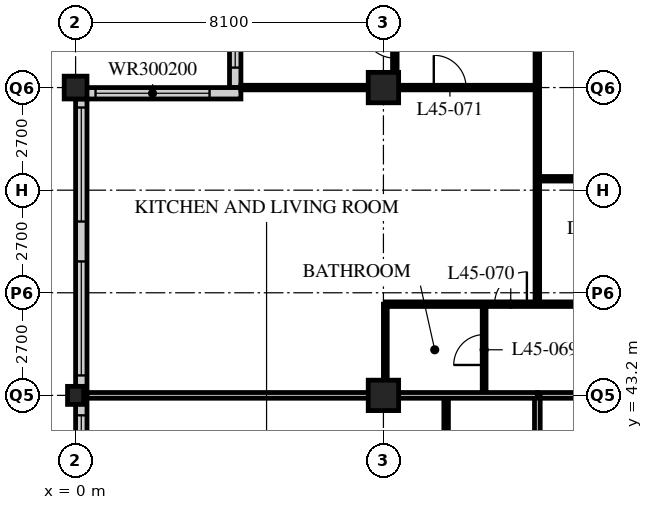
"""IFC4 building model, lengths in metres.
Left out: names, types, materials, properties, quantities, classifications, styles, units other than length and angle.
Written with IfcOpenShell. Run it as: python <this file> out.ifc"""

import sys

from ifc_helpers import new_model, si_unit, direction, frame, frame_2d, origin, origin_2d, place, context, subcontext, project, spatial, rectangle, hollow_rectangle, i_section, extrude, element, fill, save


model = new_model("IFC4")
c1 = context("Model", 3, precision=1e-05, world=origin(), true_north=direction((0.0, 1.0)))
c2 = subcontext(c1, "Body", "Model", "MODEL_VIEW")
j1 = project(units=[si_unit("LENGTHUNIT", "METRE"), si_unit("PLANEANGLEUNIT", "RADIAN")], contexts=[c1])
p1 = place(None, origin())
s1 = spatial("IfcSite", under=j1, at=p1, CompositionType="ELEMENT")
p2 = place(p1, origin())
s2 = spatial("IfcBuilding", under=s1, at=p2, CompositionType="ELEMENT")
p3 = place(p2, frame((0.0, 0.0, 177.6)))
s3 = spatial("IfcBuildingStorey", under=s2, at=p3, CompositionType="ELEMENT", Elevation=177.6)
p4 = place(p3, frame((0.0, 43.2, 0.0), z_axis=(0.0, 0.0, 1.0), x_axis=(1.0, 0.0, 0.0)))
e1 = element("IfcColumn", 1, at=p4, inside=s3, PredefinedType="COLUMN", context=c2, shape_type="SweptSolid", body=[
    extrude(i_section(OverallWidth=0.424, OverallDepth=0.475, WebThickness=0.048, FlangeThickness=0.077, FilletRadius=0.015, at=origin_2d()), origin(), (0.0, 0.0, 1.0), 3.6),
])
p5 = place(p3, frame((0.0, 51.3, 0.0), z_axis=(0.0, 0.0, 1.0), x_axis=(1.0, 0.0, 0.0)))
e2 = element("IfcColumn", 2, at=p5, inside=s3, PredefinedType="COLUMN", context=c2, shape_type="SweptSolid", body=[
    extrude(hollow_rectangle(XDim=0.6, YDim=0.6, WallThickness=0.05, at=origin_2d()), origin(), (0.0, 0.0, 1.0), 3.6),
])
for number, where, z_axis, x_axis in (
    (3, (8.1, 43.2, 0.0), (0.0, 0.0, 1.0), (1.0, 0.0, 0.0)),
    (4, (8.1, 51.3, 0.0), (0.0, 0.0, 1.0), (1.0, 0.0, 0.0)),
):
    element("IfcColumn", number, at=place(p3, frame(where, z_axis=z_axis, x_axis=x_axis)), inside=s3, PredefinedType="COLUMN", context=c2, shape_type="SweptSolid", body=[
        extrude(hollow_rectangle(XDim=0.8, YDim=0.8, WallThickness=0.08, at=origin_2d()), origin(), (0.0, 0.0, 1.0), 3.6),
    ])
p6 = place(p3, frame((4.2, 55.05, 0.0), z_axis=(0.0, 0.0, 1.0), x_axis=(0.0, -1.0, 0.0)))
e5 = element("IfcWall", 5, at=p6, inside=s3, PredefinedType="SOLIDWALL", context=c2, shape_type="SweptSolid", body=[
    extrude(rectangle(XDim=3.75, YDim=0.3, at=frame_2d((1.875, 0.0))), origin(), (0.0, 0.0, 1.0), 3.39),
])
p7 = place(p6, frame((0.225, 0.0, 0.6)))
e6 = element("IfcOpeningElement", 6, at=p7, cuts=e5, PredefinedType="OPENING", context=c2, shape_type="SweptSolid", body=[
    extrude(rectangle(XDim=3.0, YDim=2.0, at=frame_2d((1.5, 1.0))), frame((0.0, 0.16, 0.0), z_axis=(0.0, -1.0, 0.0), x_axis=(1.0, 0.0, 0.0)), (0.0, 0.0, 1.0), 0.32),
])
p8 = place(p3, frame((4.35, 51.15, 0.0), z_axis=(0.0, 0.0, 1.0), x_axis=(-1.0, 0.0, 0.0)))
e7 = element("IfcWall", 7, at=p8, inside=s3, PredefinedType="SOLIDWALL", context=c2, shape_type="SweptSolid", body=[
    extrude(rectangle(XDim=4.35, YDim=0.3, at=frame_2d((2.175, 0.0))), origin(), (0.0, 0.0, 1.0), 3.39),
])
p9 = place(p8, frame((0.825, 0.0, 0.6)))
e8 = element("IfcOpeningElement", 8, at=p9, cuts=e7, PredefinedType="OPENING", context=c2, shape_type="SweptSolid", body=[
    extrude(rectangle(XDim=3.0, YDim=2.0, at=frame_2d((1.5, 1.0))), frame((0.0, 0.16, 0.0), z_axis=(0.0, -1.0, 0.0), x_axis=(1.0, 0.0, 0.0)), (0.0, 0.0, 1.0), 0.32),
])
p10 = place(p3, frame((0.15, 51.0, 0.0), z_axis=(0.0, 0.0, 1.0), x_axis=(0.0, -1.0, 0.0)))
e9 = element("IfcWall", 9, at=p10, inside=s3, PredefinedType="SOLIDWALL", context=c2, shape_type="SweptSolid", body=[
    extrude(rectangle(XDim=32.1, YDim=0.3, at=frame_2d((16.05, 0.0))), origin(), (0.0, 0.0, 1.0), 3.39),
])
p11 = place(p10, frame((0.225, 0.0, 0.6)))
e10 = element("IfcOpeningElement", 10, at=p11, cuts=e9, PredefinedType="OPENING", context=c2, shape_type="SweptSolid", body=[
    extrude(rectangle(XDim=3.0, YDim=2.4, at=frame_2d((1.5, 1.2))), frame((0.0, 0.16, 0.0), z_axis=(0.0, -1.0, 0.0), x_axis=(1.0, 0.0, 0.0)), (0.0, 0.0, 1.0), 0.32),
])
p12 = place(p10, frame((4.275, 0.0, 0.6)))
e11 = element("IfcOpeningElement", 11, at=p12, cuts=e9, PredefinedType="OPENING", context=c2, shape_type="SweptSolid", body=[
    extrude(rectangle(XDim=3.0, YDim=2.4, at=frame_2d((1.5, 1.2))), frame((0.0, 0.16, 0.0), z_axis=(0.0, -1.0, 0.0), x_axis=(1.0, 0.0, 0.0)), (0.0, 0.0, 1.0), 0.32),
])
p13 = place(p10, frame((8.325, 0.0, 0.6)))
e12 = element("IfcOpeningElement", 12, at=p13, cuts=e9, PredefinedType="OPENING", context=c2, shape_type="SweptSolid", body=[
    extrude(rectangle(XDim=3.0, YDim=2.4, at=frame_2d((1.5, 1.2))), frame((0.0, 0.16, 0.0), z_axis=(0.0, -1.0, 0.0), x_axis=(1.0, 0.0, 0.0)), (0.0, 0.0, 1.0), 0.32),
])
p14 = place(p10, frame((12.375, 0.0, 0.6)))
e13 = element("IfcOpeningElement", 13, at=p14, cuts=e9, PredefinedType="OPENING", context=c2, shape_type="SweptSolid", body=[
    extrude(rectangle(XDim=3.0, YDim=2.4, at=frame_2d((1.5, 1.2))), frame((0.0, 0.16, 0.0), z_axis=(0.0, -1.0, 0.0), x_axis=(1.0, 0.0, 0.0)), (0.0, 0.0, 1.0), 0.32),
])
p15 = place(p10, frame((16.425, 0.0, 0.6)))
e14 = element("IfcOpeningElement", 14, at=p15, cuts=e9, PredefinedType="OPENING", context=c2, shape_type="SweptSolid", body=[
    extrude(rectangle(XDim=3.0, YDim=2.4, at=frame_2d((1.5, 1.2))), frame((0.0, 0.16, 0.0), z_axis=(0.0, -1.0, 0.0), x_axis=(1.0, 0.0, 0.0)), (0.0, 0.0, 1.0), 0.32),
])
p16 = place(p10, frame((20.475, 0.0, 0.6)))
e15 = element("IfcOpeningElement", 15, at=p16, cuts=e9, PredefinedType="OPENING", context=c2, shape_type="SweptSolid", body=[
    extrude(rectangle(XDim=3.0, YDim=2.4, at=frame_2d((1.5, 1.2))), frame((0.0, 0.16, 0.0), z_axis=(0.0, -1.0, 0.0), x_axis=(1.0, 0.0, 0.0)), (0.0, 0.0, 1.0), 0.32),
])
p17 = place(p10, frame((24.525, 0.0, 0.6)))
e16 = element("IfcOpeningElement", 16, at=p17, cuts=e9, PredefinedType="OPENING", context=c2, shape_type="SweptSolid", body=[
    extrude(rectangle(XDim=3.0, YDim=2.4, at=frame_2d((1.5, 1.2))), frame((0.0, 0.16, 0.0), z_axis=(0.0, -1.0, 0.0), x_axis=(1.0, 0.0, 0.0)), (0.0, 0.0, 1.0), 0.32),
])
p18 = place(p10, frame((28.575, 0.0, 0.6)))
e17 = element("IfcOpeningElement", 17, at=p18, cuts=e9, PredefinedType="OPENING", context=c2, shape_type="SweptSolid", body=[
    extrude(rectangle(XDim=3.0, YDim=2.4, at=frame_2d((1.5, 1.2))), frame((0.0, 0.16, 0.0), z_axis=(0.0, -1.0, 0.0), x_axis=(1.0, 0.0, 0.0)), (0.0, 0.0, 1.0), 0.32),
])
p19 = place(p3, frame((12.15, 43.2, 0.0), z_axis=(0.0, 0.0, 1.0), x_axis=(1.0, 0.0, 0.0)))
e18 = element("IfcWall", 18, at=p19, inside=s3, PredefinedType="PARTITIONING", context=c2, shape_type="SweptSolid", body=[
    extrude(rectangle(XDim=32.4, YDim=0.15, at=frame_2d((16.2, 0.0))), origin(), (0.0, 0.0, 1.0), 2.778),
])
p20 = place(p19, frame((4.95, 0.0, 0.0)))
e19 = element("IfcOpeningElement", 19, at=p20, cuts=e18, PredefinedType="OPENING", context=c2, shape_type="SweptSolid", body=[
    extrude(rectangle(XDim=1.0, YDim=2.1, at=frame_2d((0.5, 1.05))), frame((0.0, 0.085, 0.0), z_axis=(0.0, -1.0, 0.0), x_axis=(1.0, 0.0, 0.0)), (0.0, 0.0, 1.0), 0.17),
])
p21 = place(p19, frame((13.05, 0.0, 0.0)))
e20 = element("IfcOpeningElement", 20, at=p21, cuts=e18, PredefinedType="OPENING", context=c2, shape_type="SweptSolid", body=[
    extrude(rectangle(XDim=1.0, YDim=2.1, at=frame_2d((0.5, 1.05))), frame((0.0, 0.085, 0.0), z_axis=(0.0, -1.0, 0.0), x_axis=(1.0, 0.0, 0.0)), (0.0, 0.0, 1.0), 0.17),
])
p22 = place(p19, frame((21.15, 0.0, 0.0)))
e21 = element("IfcOpeningElement", 21, at=p22, cuts=e18, PredefinedType="OPENING", context=c2, shape_type="SweptSolid", body=[
    extrude(rectangle(XDim=1.0, YDim=2.1, at=frame_2d((0.5, 1.05))), frame((0.0, 0.085, 0.0), z_axis=(0.0, -1.0, 0.0), x_axis=(1.0, 0.0, 0.0)), (0.0, 0.0, 1.0), 0.17),
])
p23 = place(p19, frame((29.875, 0.0, 0.0)))
e22 = element("IfcOpeningElement", 22, at=p23, cuts=e18, PredefinedType="OPENING", context=c2, shape_type="SweptSolid", body=[
    extrude(rectangle(XDim=1.0, YDim=2.1, at=frame_2d((0.5, 1.05))), frame((0.0, 0.085, 0.0), z_axis=(0.0, -1.0, 0.0), x_axis=(1.0, 0.0, 0.0)), (0.0, 0.0, 1.0), 0.17),
])
p24 = place(p19, frame((1.525, 0.0, 0.0)))
e23 = element("IfcOpeningElement", 23, at=p24, cuts=e18, PredefinedType="OPENING", context=c2, shape_type="SweptSolid", body=[
    extrude(rectangle(XDim=1.0, YDim=2.1, at=frame_2d((0.5, 1.05))), frame((0.0, 0.085, 0.0), z_axis=(0.0, -1.0, 0.0), x_axis=(1.0, 0.0, 0.0)), (0.0, 0.0, 1.0), 0.17),
])
p25 = place(p3, frame((12.15, 18.9, 0.0), z_axis=(0.0, 0.0, 1.0), x_axis=(0.0, 1.0, 0.0)))
e24 = element("IfcWall", 24, at=p25, inside=s3, PredefinedType="PARTITIONING", context=c2, shape_type="SweptSolid", body=[
    extrude(rectangle(XDim=24.3, YDim=0.15, at=frame_2d((12.15, 0.0))), origin(), (0.0, 0.0, 1.0), 3.39),
])
p26 = place(p25, frame((2.35, 0.0, 0.0)))
e25 = element("IfcOpeningElement", 25, at=p26, cuts=e24, PredefinedType="OPENING", context=c2, shape_type="SweptSolid", body=[
    extrude(rectangle(XDim=1.0, YDim=2.1, at=frame_2d((0.5, 1.05))), frame((0.0, 0.085, 0.0), z_axis=(0.0, -1.0, 0.0), x_axis=(1.0, 0.0, 0.0)), (0.0, 0.0, 1.0), 0.17),
])
p27 = place(p25, frame((6.4, 0.0, 0.0)))
e26 = element("IfcOpeningElement", 26, at=p27, cuts=e24, PredefinedType="OPENING", context=c2, shape_type="SweptSolid", body=[
    extrude(rectangle(XDim=1.0, YDim=2.1, at=frame_2d((0.5, 1.05))), frame((0.0, 0.085, 0.0), z_axis=(0.0, -1.0, 0.0), x_axis=(1.0, 0.0, 0.0)), (0.0, 0.0, 1.0), 0.17),
])
p28 = place(p25, frame((8.5, 0.0, 0.0)))
e27 = element("IfcOpeningElement", 27, at=p28, cuts=e24, PredefinedType="OPENING", context=c2, shape_type="SweptSolid", body=[
    extrude(rectangle(XDim=1.0, YDim=2.1, at=frame_2d((0.5, 1.05))), frame((0.0, 0.085, 0.0), z_axis=(0.0, -1.0, 0.0), x_axis=(1.0, 0.0, 0.0)), (0.0, 0.0, 1.0), 0.17),
])
p29 = place(p25, frame((16.6, 0.0, 0.0)))
e28 = element("IfcOpeningElement", 28, at=p29, cuts=e24, PredefinedType="OPENING", context=c2, shape_type="SweptSolid", body=[
    extrude(rectangle(XDim=1.0, YDim=2.1, at=frame_2d((0.5, 1.05))), frame((0.0, 0.085, 0.0), z_axis=(0.0, -1.0, 0.0), x_axis=(1.0, 0.0, 0.0)), (0.0, 0.0, 1.0), 0.17),
])
p30 = place(p3, frame((9.75, 27.0, 0.0), z_axis=(0.0, 0.0, 1.0), x_axis=(0.0, 1.0, 0.0)))
e29 = element("IfcWall", 29, at=p30, inside=s3, PredefinedType="PARTITIONING", context=c2, shape_type="SweptSolid", body=[
    extrude(rectangle(XDim=16.2, YDim=0.12, at=frame_2d((8.1, 0.0))), origin(), (0.0, 0.0, 1.0), 3.39),
])
p31 = place(p30, frame((0.975, 0.0, 0.0)))
e30 = element("IfcOpeningElement", 30, at=p31, cuts=e29, PredefinedType="OPENING", context=c2, shape_type="SweptSolid", body=[
    extrude(rectangle(XDim=0.85, YDim=2.1, at=frame_2d((0.425, 1.05))), frame((0.0, 0.07, 0.0), z_axis=(0.0, -1.0, 0.0), x_axis=(1.0, 0.0, 0.0)), (0.0, 0.0, 1.0), 0.14),
])
p32 = place(p30, frame((4.375, 0.0, 0.0)))
e31 = element("IfcOpeningElement", 31, at=p32, cuts=e29, PredefinedType="OPENING", context=c2, shape_type="SweptSolid", body=[
    extrude(rectangle(XDim=0.85, YDim=2.1, at=frame_2d((0.425, 1.05))), frame((0.0, 0.07, 0.0), z_axis=(0.0, -1.0, 0.0), x_axis=(1.0, 0.0, 0.0)), (0.0, 0.0, 1.0), 0.14),
])
p33 = place(p30, frame((9.075, 0.0, 0.0)))
e32 = element("IfcOpeningElement", 32, at=p33, cuts=e29, PredefinedType="OPENING", context=c2, shape_type="SweptSolid", body=[
    extrude(rectangle(XDim=0.85, YDim=2.1, at=frame_2d((0.425, 1.05))), frame((0.0, 0.07, 0.0), z_axis=(0.0, -1.0, 0.0), x_axis=(1.0, 0.0, 0.0)), (0.0, 0.0, 1.0), 0.14),
])
p34 = place(p30, frame((12.475, 0.0, 0.0)))
e33 = element("IfcOpeningElement", 33, at=p34, cuts=e29, PredefinedType="OPENING", context=c2, shape_type="SweptSolid", body=[
    extrude(rectangle(XDim=0.85, YDim=2.1, at=frame_2d((0.425, 1.05))), frame((0.0, 0.07, 0.0), z_axis=(0.0, -1.0, 0.0), x_axis=(1.0, 0.0, 0.0)), (0.0, 0.0, 1.0), 0.14),
])
p35 = place(p3, frame((10.75, 43.2, 0.0), z_axis=(0.0, 0.0, 1.0), x_axis=(0.0, 1.0, 0.0)))
e34 = element("IfcWall", 34, at=p35, inside=s3, PredefinedType="PARTITIONING", context=c2, shape_type="SweptSolid", body=[
    extrude(rectangle(XDim=2.4, YDim=0.1, at=frame_2d((1.2, 0.0))), origin(), (0.0, 0.0, 1.0), 3.39),
])
p36 = place(p35, frame((0.8, 0.0, 0.0)))
e35 = element("IfcOpeningElement", 35, at=p36, cuts=e34, PredefinedType="OPENING", context=c2, shape_type="SweptSolid", body=[
    extrude(rectangle(XDim=0.8, YDim=2.1, at=frame_2d((0.4, 1.05))), frame((0.0, 0.06, 0.0), z_axis=(0.0, -1.0, 0.0), x_axis=(1.0, 0.0, 0.0)), (0.0, 0.0, 1.0), 0.12),
])
p37 = place(p3, frame((8.15, 43.2, 0.0), z_axis=(0.0, 0.0, 1.0), x_axis=(0.0, 1.0, 0.0)))
e36 = element("IfcWall", 36, at=p37, inside=s3, PredefinedType="PARTITIONING", context=c2, shape_type="SweptSolid", body=[
    extrude(rectangle(XDim=2.4, YDim=0.1, at=frame_2d((1.2, 0.0))), origin(), (0.0, 0.0, 1.0), 2.778),
])
p38 = place(p3, frame((8.15, 45.6, 0.0), z_axis=(0.0, 0.0, 1.0), x_axis=(1.0, 0.0, 0.0)))
e37 = element("IfcWall", 37, at=p38, inside=s3, PredefinedType="PARTITIONING", context=c2, shape_type="SweptSolid", body=[
    extrude(rectangle(XDim=40.4, YDim=0.12, at=frame_2d((20.2, 0.0))), origin(), (0.0, 0.0, 1.0), 3.39),
])
p39 = place(p38, frame((9.025, 0.0, 0.0)))
e38 = element("IfcOpeningElement", 38, at=p39, cuts=e37, PredefinedType="OPENING", context=c2, shape_type="SweptSolid", body=[
    extrude(rectangle(XDim=0.85, YDim=2.1, at=frame_2d((0.425, 1.05))), frame((0.0, 0.07, 0.0), z_axis=(0.0, -1.0, 0.0), x_axis=(1.0, 0.0, 0.0)), (0.0, 0.0, 1.0), 0.14),
])
p40 = place(p38, frame((12.425, 0.0, 0.0)))
e39 = element("IfcOpeningElement", 39, at=p40, cuts=e37, PredefinedType="OPENING", context=c2, shape_type="SweptSolid", body=[
    extrude(rectangle(XDim=0.85, YDim=2.1, at=frame_2d((0.425, 1.05))), frame((0.0, 0.07, 0.0), z_axis=(0.0, -1.0, 0.0), x_axis=(1.0, 0.0, 0.0)), (0.0, 0.0, 1.0), 0.14),
])
p41 = place(p38, frame((17.125, 0.0, 0.0)))
e40 = element("IfcOpeningElement", 40, at=p41, cuts=e37, PredefinedType="OPENING", context=c2, shape_type="SweptSolid", body=[
    extrude(rectangle(XDim=0.85, YDim=2.1, at=frame_2d((0.425, 1.05))), frame((0.0, 0.07, 0.0), z_axis=(0.0, -1.0, 0.0), x_axis=(1.0, 0.0, 0.0)), (0.0, 0.0, 1.0), 0.14),
])
p42 = place(p38, frame((20.525, 0.0, 0.0)))
e41 = element("IfcOpeningElement", 41, at=p42, cuts=e37, PredefinedType="OPENING", context=c2, shape_type="SweptSolid", body=[
    extrude(rectangle(XDim=0.85, YDim=2.1, at=frame_2d((0.425, 1.05))), frame((0.0, 0.07, 0.0), z_axis=(0.0, -1.0, 0.0), x_axis=(1.0, 0.0, 0.0)), (0.0, 0.0, 1.0), 0.14),
])
p43 = place(p38, frame((25.225, 0.0, 0.0)))
e42 = element("IfcOpeningElement", 42, at=p43, cuts=e37, PredefinedType="OPENING", context=c2, shape_type="SweptSolid", body=[
    extrude(rectangle(XDim=0.85, YDim=2.1, at=frame_2d((0.425, 1.05))), frame((0.0, 0.07, 0.0), z_axis=(0.0, -1.0, 0.0), x_axis=(1.0, 0.0, 0.0)), (0.0, 0.0, 1.0), 0.14),
])
p44 = place(p38, frame((28.625, 0.0, 0.0)))
e43 = element("IfcOpeningElement", 43, at=p44, cuts=e37, PredefinedType="OPENING", context=c2, shape_type="SweptSolid", body=[
    extrude(rectangle(XDim=0.85, YDim=2.1, at=frame_2d((0.425, 1.05))), frame((0.0, 0.07, 0.0), z_axis=(0.0, -1.0, 0.0), x_axis=(1.0, 0.0, 0.0)), (0.0, 0.0, 1.0), 0.14),
])
p45 = place(p38, frame((32.825, 0.0, 0.0)))
e44 = element("IfcOpeningElement", 44, at=p45, cuts=e37, PredefinedType="OPENING", context=c2, shape_type="SweptSolid", body=[
    extrude(rectangle(XDim=0.85, YDim=2.1, at=frame_2d((0.425, 1.05))), frame((0.0, 0.07, 0.0), z_axis=(0.0, -1.0, 0.0), x_axis=(1.0, 0.0, 0.0)), (0.0, 0.0, 1.0), 0.14),
])
p46 = place(p38, frame((36.675, 0.0, 0.0)))
e45 = element("IfcOpeningElement", 45, at=p46, cuts=e37, PredefinedType="OPENING", context=c2, shape_type="SweptSolid", body=[
    extrude(rectangle(XDim=0.85, YDim=2.1, at=frame_2d((0.425, 1.05))), frame((0.0, 0.07, 0.0), z_axis=(0.0, -1.0, 0.0), x_axis=(1.0, 0.0, 0.0)), (0.0, 0.0, 1.0), 0.14),
])
p47 = place(p38, frame((6.725, 0.0, 0.0)))
e46 = element("IfcOpeningElement", 46, at=p47, cuts=e37, PredefinedType="OPENING", context=c2, shape_type="SweptSolid", body=[
    extrude(rectangle(XDim=0.85, YDim=2.1, at=frame_2d((0.425, 1.05))), frame((0.0, 0.07, 0.0), z_axis=(0.0, -1.0, 0.0), x_axis=(1.0, 0.0, 0.0)), (0.0, 0.0, 1.0), 0.14),
])
p48 = place(p38, frame((2.875, 0.0, 0.0)))
e47 = element("IfcOpeningElement", 47, at=p48, cuts=e37, PredefinedType="OPENING", context=c2, shape_type="SweptSolid", body=[
    extrude(rectangle(XDim=0.85, YDim=2.1, at=frame_2d((0.425, 1.05))), frame((0.0, 0.07, 0.0), z_axis=(0.0, -1.0, 0.0), x_axis=(1.0, 0.0, 0.0)), (0.0, 0.0, 1.0), 0.14),
])
p49 = place(p3, frame((12.15, 45.6, 0.0), z_axis=(0.0, 0.0, 1.0), x_axis=(0.0, 1.0, 0.0)))
e48 = element("IfcWall", 48, at=p49, inside=s3, PredefinedType="PARTITIONING", context=c2, shape_type="SweptSolid", body=[
    extrude(rectangle(XDim=13.5, YDim=0.12, at=frame_2d((6.75, 0.0))), origin(), (0.0, 0.0, 1.0), 3.39),
])
p50 = place(p3, frame((12.15, 51.3, 0.0), z_axis=(0.0, 0.0, 1.0), x_axis=(-1.0, 0.0, 0.0)))
e49 = element("IfcWall", 49, at=p50, inside=s3, PredefinedType="PARTITIONING", context=c2, shape_type="SweptSolid", body=[
    extrude(rectangle(XDim=7.8, YDim=0.12, at=frame_2d((3.9, 0.0))), origin(), (0.0, 0.0, 1.0), 2.778),
])
p51 = place(p50, frame((1.875, 0.0, 0.0)))
e50 = element("IfcOpeningElement", 50, at=p51, cuts=e49, PredefinedType="OPENING", context=c2, shape_type="SweptSolid", body=[
    extrude(rectangle(XDim=0.85, YDim=2.1, at=frame_2d((0.425, 1.05))), frame((0.0, 0.07, 0.0), z_axis=(0.0, -1.0, 0.0), x_axis=(1.0, 0.0, 0.0)), (0.0, 0.0, 1.0), 0.14),
])
p52 = place(p3, frame((0.3, 43.2, 0.0), z_axis=(0.0, 0.0, 1.0), x_axis=(1.0, 0.0, 0.0)))
e51 = element("IfcWall", 51, at=p52, inside=s3, PredefinedType="PARTITIONING", context=c2, shape_type="SweptSolid", body=[
    extrude(rectangle(XDim=11.85, YDim=0.15, at=frame_2d((5.925, 0.0))), origin(), (0.0, 0.0, 1.0), 2.778),
])
p53 = place(p3, frame((8.4, 55.06, 0.0), z_axis=(0.0, 0.0, 1.0), x_axis=(0.0, -1.0, 0.0)))
e52 = element("IfcWall", 52, at=p53, inside=s3, PredefinedType="PARTITIONING", context=c2, shape_type="SweptSolid", body=[
    extrude(rectangle(XDim=3.76, YDim=0.12, at=frame_2d((1.88, 0.0))), origin(), (0.0, 0.0, 1.0), 3.39),
])
p54 = place(p53, frame((2.135, 0.0, 0.0)))
e53 = element("IfcOpeningElement", 53, at=p54, cuts=e52, PredefinedType="OPENING", context=c2, shape_type="SweptSolid", body=[
    extrude(rectangle(XDim=0.85, YDim=2.1, at=frame_2d((0.425, 1.05))), frame((0.0, 0.07, 0.0), z_axis=(0.0, -1.0, 0.0), x_axis=(1.0, 0.0, 0.0)), (0.0, 0.0, 1.0), 0.14),
])
p55 = place(p3, frame((12.15, 48.9, 0.0), z_axis=(0.0, 0.0, 1.0), x_axis=(1.0, 0.0, 0.0)))
e54 = element("IfcWall", 54, at=p55, inside=s3, PredefinedType="PARTITIONING", context=c2, shape_type="SweptSolid", body=[
    extrude(rectangle(XDim=4.05, YDim=0.12, at=frame_2d((2.025, 0.0))), origin(), (0.0, 0.0, 1.0), 3.39),
])
p56 = place(p55, frame((1.6, 0.0, 0.0)))
e55 = element("IfcOpeningElement", 55, at=p56, cuts=e54, PredefinedType="OPENING", context=c2, shape_type="SweptSolid", body=[
    extrude(rectangle(XDim=0.85, YDim=2.1, at=frame_2d((0.425, 1.05))), frame((0.0, 0.07, 0.0), z_axis=(0.0, -1.0, 0.0), x_axis=(1.0, 0.0, 0.0)), (0.0, 0.0, 1.0), 0.14),
])
p57 = place(p7, origin())
e56 = element("IfcWindow", 56, at=p57, inside=s3, PartitioningType="SINGLE_PANEL", PredefinedType="WINDOW", context=c2, shape_type="SweptSolid", body=[
    extrude(rectangle(XDim=3.0, YDim=2.0, at=frame_2d((1.5, 1.0))), frame((0.0, 0.03, 0.0), z_axis=(0.0, -1.0, 0.0), x_axis=(1.0, 0.0, 0.0)), (0.0, 0.0, 1.0), 0.06),
])
fill(e6, e56)
p58 = place(p9, origin())
e57 = element("IfcWindow", 57, at=p58, inside=s3, PartitioningType="SINGLE_PANEL", PredefinedType="WINDOW", context=c2, shape_type="SweptSolid", body=[
    extrude(rectangle(XDim=3.0, YDim=2.0, at=frame_2d((1.5, 1.0))), frame((0.0, 0.03, 0.0), z_axis=(0.0, -1.0, 0.0), x_axis=(1.0, 0.0, 0.0)), (0.0, 0.0, 1.0), 0.06),
])
fill(e8, e57)
p59 = place(p11, origin())
e58 = element("IfcWindow", 58, at=p59, inside=s3, PartitioningType="SINGLE_PANEL", PredefinedType="WINDOW", context=c2, shape_type="SweptSolid", body=[
    extrude(rectangle(XDim=3.0, YDim=2.4, at=frame_2d((1.5, 1.2))), frame((0.0, 0.03, 0.0), z_axis=(0.0, -1.0, 0.0), x_axis=(1.0, 0.0, 0.0)), (0.0, 0.0, 1.0), 0.06),
])
fill(e10, e58)
p60 = place(p12, origin())
e59 = element("IfcWindow", 59, at=p60, inside=s3, PartitioningType="SINGLE_PANEL", PredefinedType="WINDOW", context=c2, shape_type="SweptSolid", body=[
    extrude(rectangle(XDim=3.0, YDim=2.4, at=frame_2d((1.5, 1.2))), frame((0.0, 0.03, 0.0), z_axis=(0.0, -1.0, 0.0), x_axis=(1.0, 0.0, 0.0)), (0.0, 0.0, 1.0), 0.06),
])
fill(e11, e59)
p61 = place(p13, origin())
e60 = element("IfcWindow", 60, at=p61, inside=s3, PartitioningType="SINGLE_PANEL", PredefinedType="WINDOW", context=c2, shape_type="SweptSolid", body=[
    extrude(rectangle(XDim=3.0, YDim=2.4, at=frame_2d((1.5, 1.2))), frame((0.0, 0.03, 0.0), z_axis=(0.0, -1.0, 0.0), x_axis=(1.0, 0.0, 0.0)), (0.0, 0.0, 1.0), 0.06),
])
fill(e12, e60)
p62 = place(p36, origin())
e61 = element("IfcDoor", 61, at=p62, inside=s3, OperationType="SINGLE_SWING_LEFT", PredefinedType="DOOR", context=c2, shape_type="SweptSolid", body=[
    extrude(rectangle(XDim=0.8, YDim=2.1, at=frame_2d((0.4, 1.05))), frame((0.0, 0.025, 0.0), z_axis=(0.0, -1.0, 0.0), x_axis=(1.0, 0.0, 0.0)), (0.0, 0.0, 1.0), 0.05),
])
fill(e35, e61)
p63 = place(p48, origin())
e62 = element("IfcDoor", 62, at=p63, inside=s3, OperationType="SINGLE_SWING_RIGHT", PredefinedType="DOOR", context=c2, shape_type="SweptSolid", body=[
    extrude(rectangle(XDim=0.85, YDim=2.1, at=frame_2d((0.425, 1.05))), frame((0.0, 0.025, 0.0), z_axis=(0.0, -1.0, 0.0), x_axis=(1.0, 0.0, 0.0)), (0.0, 0.0, 1.0), 0.05),
])
fill(e47, e62)
p64 = place(p51, origin())
e63 = element("IfcDoor", 63, at=p64, inside=s3, OperationType="SINGLE_SWING_LEFT", PredefinedType="DOOR", context=c2, shape_type="SweptSolid", body=[
    extrude(rectangle(XDim=0.85, YDim=2.1, at=frame_2d((0.425, 1.05))), frame((0.0, 0.025, 0.0), z_axis=(0.0, -1.0, 0.0), x_axis=(1.0, 0.0, 0.0)), (0.0, 0.0, 1.0), 0.05),
])
fill(e50, e63)
p65 = place(p54, origin())
e64 = element("IfcDoor", 64, at=p65, inside=s3, OperationType="SINGLE_SWING_RIGHT", PredefinedType="DOOR", context=c2, shape_type="SweptSolid", body=[
    extrude(rectangle(XDim=0.85, YDim=2.1, at=frame_2d((0.425, 1.05))), frame((0.0, 0.025, 0.0), z_axis=(0.0, -1.0, 0.0), x_axis=(1.0, 0.0, 0.0)), (0.0, 0.0, 1.0), 0.05),
])
fill(e53, e64)
save(model, sys.argv[1])
